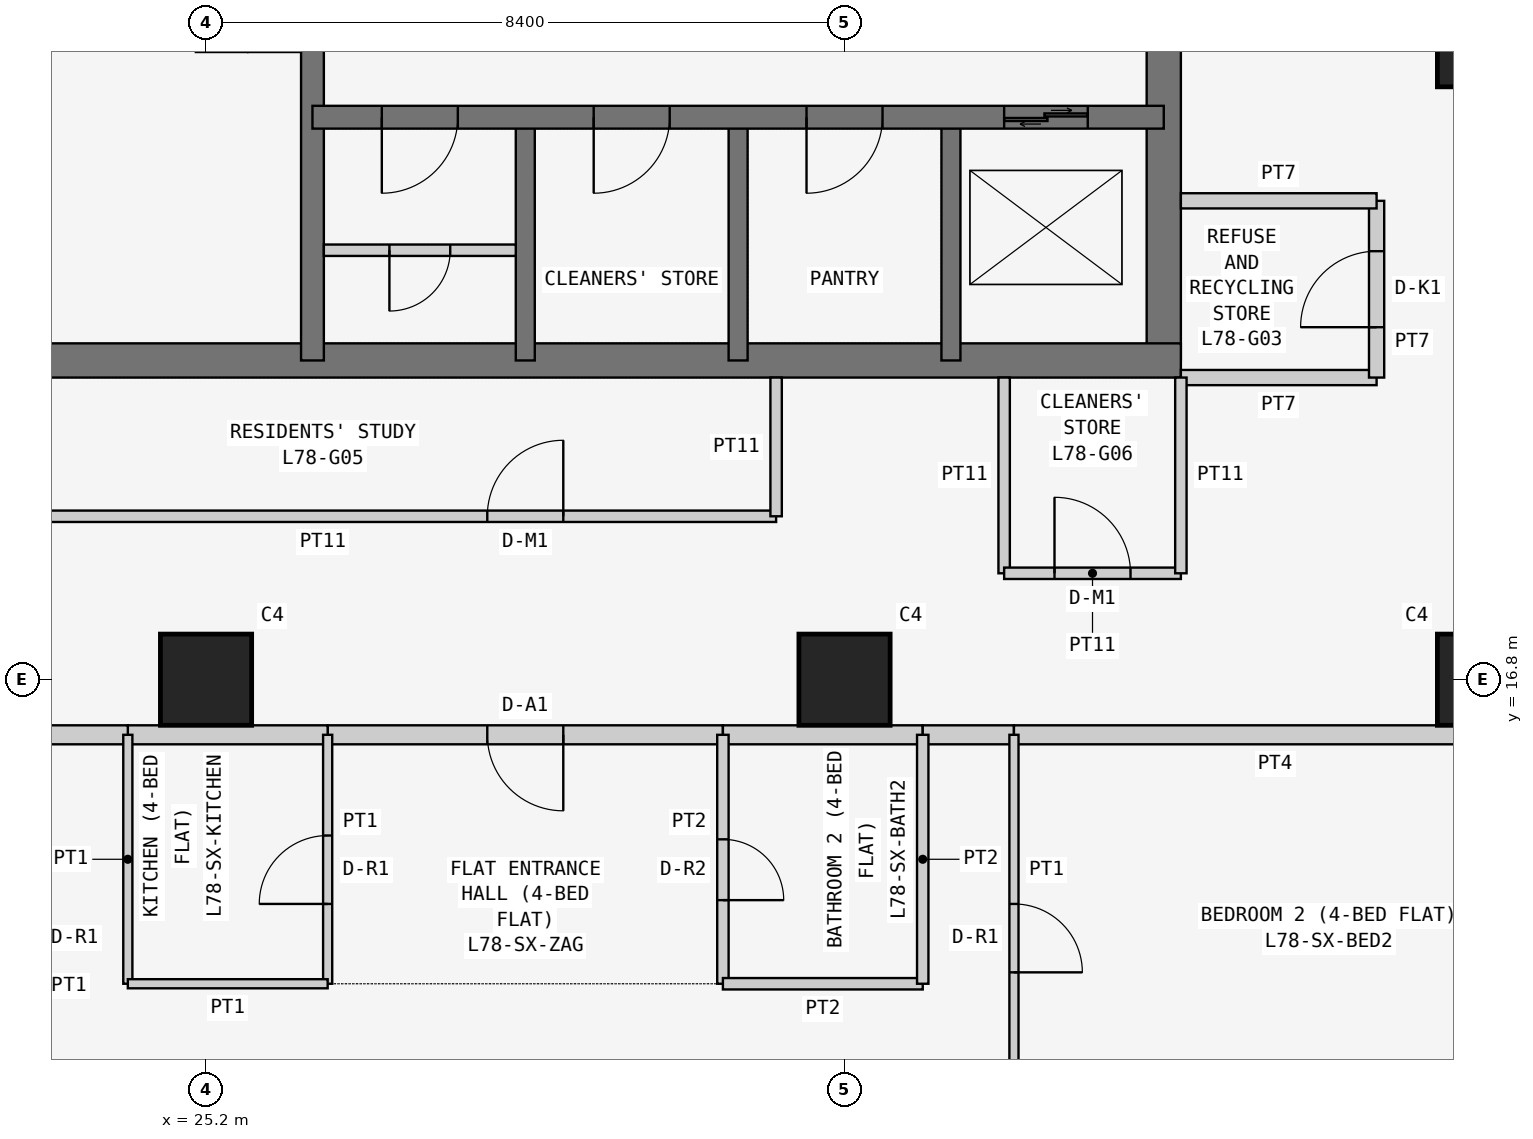
"""IFC4 building model, lengths in metres.
Left out: names, types, materials, properties, quantities, classifications, styles, units other than length and angle.
Written with IfcOpenShell. Run it as: python <this file> out.ifc"""

import sys

from ifc_helpers import new_model, si_unit, direction, frame, frame_2d, origin, origin_2d, place, context, subcontext, project, spatial, rectangle, extrude, element, fill, save


model = new_model("IFC4")
c1 = context("Model", 3, precision=1e-05, world=origin(), true_north=direction((0.0, 1.0)))
c2 = subcontext(c1, "Body", "Model", "MODEL_VIEW")
j1 = project(units=[si_unit("LENGTHUNIT", "METRE"), si_unit("PLANEANGLEUNIT", "RADIAN")], contexts=[c1])
p1 = place(None, origin())
s1 = spatial("IfcSite", under=j1, at=p1, CompositionType="ELEMENT")
p2 = place(p1, origin())
s2 = spatial("IfcBuilding", under=s1, at=p2, CompositionType="ELEMENT")
p3 = place(p2, frame((0.0, 0.0, 297.3)))
s3 = spatial("IfcBuildingStorey", under=s2, at=p3, CompositionType="ELEMENT", Elevation=297.3)
for number, where, z_axis, x_axis in (
    (1, (25.2, 16.8, 0.0), (0.0, 0.0, 1.0), (1.0, 0.0, 0.0)),
    (2, (33.6, 16.8, 0.0), (0.0, 0.0, 1.0), (1.0, 0.0, 0.0)),
    (3, (42.0, 16.8, 0.0), (0.0, 0.0, 1.0), (1.0, 0.0, 0.0)),
    (4, (42.0, 25.2, 0.0), (0.0, 0.0, 1.0), (1.0, 0.0, 0.0)),
):
    element("IfcColumn", number, at=place(p3, frame(where, z_axis=z_axis, x_axis=x_axis)), inside=s3, PredefinedType="COLUMN", context=c2, shape_type="SweptSolid", body=[
        extrude(rectangle(XDim=1.2, YDim=1.2, at=origin_2d()), origin(), (0.0, 0.0, 1.0), 3.6),
    ])
p4 = place(p3, frame((21.0, 21.0, 0.0), z_axis=(0.0, 0.0, 1.0), x_axis=(1.0, 0.0, 0.0)))
e5 = element("IfcWall", 5, at=p4, inside=s3, PredefinedType="SHEAR", context=c2, shape_type="SweptSolid", body=[
    extrude(rectangle(XDim=17.025, YDim=0.45, at=frame_2d((8.512, 0.0))), origin(), (0.0, 0.0, 1.0), 3.6),
])
p5 = place(p3, frame((37.8, 21.0, 0.0), z_axis=(0.0, 0.0, 1.0), x_axis=(0.0, 1.0, 0.0)))
e6 = element("IfcWall", 6, at=p5, inside=s3, PredefinedType="SHEAR", context=c2, shape_type="SweptSolid", body=[
    extrude(rectangle(XDim=17.025, YDim=0.45, at=frame_2d((8.512, 0.0))), origin(), (0.0, 0.0, 1.0), 3.6),
])
p6 = place(p5, frame((5.2, 0.0, 0.0)))
e7 = element("IfcOpeningElement", 7, at=p6, cuts=e6, PredefinedType="OPENING", context=c2, shape_type="SweptSolid", body=[
    extrude(rectangle(XDim=1.2, YDim=2.1, at=frame_2d((0.6, 1.05))), frame((0.0, 0.235, 0.0), z_axis=(0.0, -1.0, 0.0), x_axis=(1.0, 0.0, 0.0)), (0.0, 0.0, 1.0), 0.47),
])
p7 = place(p3, frame((26.6, 21.0, 0.0), z_axis=(0.0, 0.0, 1.0), x_axis=(0.0, 1.0, 0.0)))
e8 = element("IfcWall", 8, at=p7, inside=s3, PredefinedType="SHEAR", context=c2, shape_type="SweptSolid", body=[
    extrude(rectangle(XDim=16.8, YDim=0.3, at=frame_2d((8.4, 0.0))), origin(), (0.0, 0.0, 1.0), 3.6),
])
p8 = place(p7, frame((10.4, 0.0, 0.0)))
e9 = element("IfcOpeningElement", 9, at=p8, cuts=e8, PredefinedType="OPENING", context=c2, shape_type="SweptSolid", body=[
    extrude(rectangle(XDim=1.2, YDim=2.1, at=frame_2d((0.6, 1.05))), frame((0.0, 0.16, 0.0), z_axis=(0.0, -1.0, 0.0), x_axis=(1.0, 0.0, 0.0)), (0.0, 0.0, 1.0), 0.32),
])
p9 = place(p3, frame((26.6, 24.2, 0.0), z_axis=(0.0, 0.0, 1.0), x_axis=(1.0, 0.0, 0.0)))
e10 = element("IfcWall", 10, at=p9, inside=s3, PredefinedType="SHEAR", context=c2, shape_type="SweptSolid", body=[
    extrude(rectangle(XDim=11.2, YDim=0.3, at=frame_2d((5.6, 0.0))), origin(), (0.0, 0.0, 1.0), 3.6),
])
p10 = place(p9, frame((0.913, 0.0, 0.0)))
e11 = element("IfcOpeningElement", 11, at=p10, cuts=e10, PredefinedType="OPENING", context=c2, shape_type="SweptSolid", body=[
    extrude(rectangle(XDim=1.0, YDim=2.1, at=frame_2d((0.5, 1.05))), frame((0.0, 0.16, 0.0), z_axis=(0.0, -1.0, 0.0), x_axis=(1.0, 0.0, 0.0)), (0.0, 0.0, 1.0), 0.32),
])
p11 = place(p9, frame((3.7, 0.0, 0.0)))
e12 = element("IfcOpeningElement", 12, at=p11, cuts=e10, PredefinedType="OPENING", context=c2, shape_type="SweptSolid", body=[
    extrude(rectangle(XDim=1.0, YDim=2.1, at=frame_2d((0.5, 1.05))), frame((0.0, 0.16, 0.0), z_axis=(0.0, -1.0, 0.0), x_axis=(1.0, 0.0, 0.0)), (0.0, 0.0, 1.0), 0.32),
])
p12 = place(p9, frame((6.5, 0.0, 0.0)))
e13 = element("IfcOpeningElement", 13, at=p12, cuts=e10, PredefinedType="OPENING", context=c2, shape_type="SweptSolid", body=[
    extrude(rectangle(XDim=1.0, YDim=2.1, at=frame_2d((0.5, 1.05))), frame((0.0, 0.16, 0.0), z_axis=(0.0, -1.0, 0.0), x_axis=(1.0, 0.0, 0.0)), (0.0, 0.0, 1.0), 0.32),
])
p13 = place(p9, frame((9.1, 0.0, 0.0)))
e14 = element("IfcOpeningElement", 14, at=p13, cuts=e10, PredefinedType="OPENING", context=c2, shape_type="SweptSolid", body=[
    extrude(rectangle(XDim=1.1, YDim=2.1, at=frame_2d((0.55, 1.05))), frame((0.0, 0.16, 0.0), z_axis=(0.0, -1.0, 0.0), x_axis=(1.0, 0.0, 0.0)), (0.0, 0.0, 1.0), 0.32),
])
for number, where, z_axis, x_axis in (
    (15, (29.4, 21.0, 0.0), (0.0, 0.0, 1.0), (0.0, 1.0, 0.0)),
    (16, (32.2, 21.0, 0.0), (0.0, 0.0, 1.0), (0.0, 1.0, 0.0)),
    (17, (35.0, 21.0, 0.0), (0.0, 0.0, 1.0), (0.0, 1.0, 0.0)),
):
    element("IfcWall", number, at=place(p3, frame(where, z_axis=z_axis, x_axis=x_axis)), inside=s3, PredefinedType="SHEAR", context=c2, shape_type="SweptSolid", body=[
        extrude(rectangle(XDim=3.2, YDim=0.25, at=frame_2d((1.6, 0.0))), origin(), (0.0, 0.0, 1.0), 3.6),
    ])
p14 = place(p3, frame((38.025, 20.775, 0.0), z_axis=(0.0, 0.0, 1.0), x_axis=(1.0, 0.0, 0.0)))
e18 = element("IfcWall", 18, at=p14, inside=s3, PredefinedType="PARTITIONING", context=c2, shape_type="SweptSolid", body=[
    extrude(rectangle(XDim=2.575, YDim=0.2, at=frame_2d((1.288, 0.0))), origin(), (0.0, 0.0, 1.0), 3.35),
])
p15 = place(p3, frame((40.6, 20.775, 0.0), z_axis=(0.0, 0.0, 1.0), x_axis=(0.0, 1.0, 0.0)))
e19 = element("IfcWall", 19, at=p15, inside=s3, PredefinedType="PARTITIONING", context=c2, shape_type="SweptSolid", body=[
    extrude(rectangle(XDim=2.325, YDim=0.2, at=frame_2d((1.163, 0.0))), origin(), (0.0, 0.0, 1.0), 3.35),
])
p16 = place(p15, frame((0.663, 0.0, 0.0)))
e20 = element("IfcOpeningElement", 20, at=p16, cuts=e19, PredefinedType="OPENING", context=c2, shape_type="SweptSolid", body=[
    extrude(rectangle(XDim=1.0, YDim=2.1, at=frame_2d((0.5, 1.05))), frame((0.0, 0.11, 0.0), z_axis=(0.0, -1.0, 0.0), x_axis=(1.0, 0.0, 0.0)), (0.0, 0.0, 1.0), 0.22),
])
p17 = place(p3, frame((40.6, 23.1, 0.0), z_axis=(0.0, 0.0, 1.0), x_axis=(-1.0, 0.0, 0.0)))
e21 = element("IfcWall", 21, at=p17, inside=s3, PredefinedType="PARTITIONING", context=c2, shape_type="SweptSolid", body=[
    extrude(rectangle(XDim=2.575, YDim=0.2, at=frame_2d((1.288, 0.0))), origin(), (0.0, 0.0, 1.0), 3.35),
])
p18 = place(p3, frame((20.775, 18.95, 0.0), z_axis=(0.0, 0.0, 1.0), x_axis=(1.0, 0.0, 0.0)))
e22 = element("IfcWall", 22, at=p18, inside=s3, PredefinedType="PARTITIONING", context=c2, shape_type="SweptSolid", body=[
    extrude(rectangle(XDim=11.925, YDim=0.15, at=frame_2d((5.962, 0.0))), origin(), (0.0, 0.0, 1.0), 3.35),
])
p19 = place(p18, frame((8.125, 0.0, 0.0)))
e23 = element("IfcOpeningElement", 23, at=p19, cuts=e22, PredefinedType="OPENING", context=c2, shape_type="SweptSolid", body=[
    extrude(rectangle(XDim=1.0, YDim=2.1, at=frame_2d((0.5, 1.05))), frame((0.0, 0.085, 0.0), z_axis=(0.0, -1.0, 0.0), x_axis=(1.0, 0.0, 0.0)), (0.0, 0.0, 1.0), 0.17),
])
p20 = place(p3, frame((32.7, 18.95, 0.0), z_axis=(0.0, 0.0, 1.0), x_axis=(0.0, 1.0, 0.0)))
e24 = element("IfcWall", 24, at=p20, inside=s3, PredefinedType="PARTITIONING", context=c2, shape_type="SweptSolid", body=[
    extrude(rectangle(XDim=1.825, YDim=0.15, at=frame_2d((0.913, 0.0))), origin(), (0.0, 0.0, 1.0), 3.35),
])
p21 = place(p3, frame((35.7, 20.775, 0.0), z_axis=(0.0, 0.0, 1.0), x_axis=(0.0, -1.0, 0.0)))
e25 = element("IfcWall", 25, at=p21, inside=s3, PredefinedType="PARTITIONING", context=c2, shape_type="SweptSolid", body=[
    extrude(rectangle(XDim=2.575, YDim=0.15, at=frame_2d((1.288, 0.0))), origin(), (0.0, 0.0, 1.0), 3.35),
])
p22 = place(p3, frame((35.7, 18.2, 0.0), z_axis=(0.0, 0.0, 1.0), x_axis=(1.0, 0.0, 0.0)))
e26 = element("IfcWall", 26, at=p22, inside=s3, PredefinedType="PARTITIONING", context=c2, shape_type="SweptSolid", body=[
    extrude(rectangle(XDim=2.325, YDim=0.15, at=frame_2d((1.163, 0.0))), origin(), (0.0, 0.0, 1.0), 3.35),
])
p23 = place(p22, frame((0.663, 0.0, 0.0)))
e27 = element("IfcOpeningElement", 27, at=p23, cuts=e26, PredefinedType="OPENING", context=c2, shape_type="SweptSolid", body=[
    extrude(rectangle(XDim=1.0, YDim=2.1, at=frame_2d((0.5, 1.05))), frame((0.0, 0.085, 0.0), z_axis=(0.0, -1.0, 0.0), x_axis=(1.0, 0.0, 0.0)), (0.0, 0.0, 1.0), 0.17),
])
p24 = place(p3, frame((38.025, 18.2, 0.0), z_axis=(0.0, 0.0, 1.0), x_axis=(0.0, 1.0, 0.0)))
e28 = element("IfcWall", 28, at=p24, inside=s3, PredefinedType="PARTITIONING", context=c2, shape_type="SweptSolid", body=[
    extrude(rectangle(XDim=2.575, YDim=0.15, at=frame_2d((1.288, 0.0))), origin(), (0.0, 0.0, 1.0), 3.35),
])
p25 = place(p3, frame((32.0, 16.075, 0.0), z_axis=(0.0, 0.0, 1.0), x_axis=(-1.0, 0.0, 0.0)))
e29 = element("IfcWall", 29, at=p25, inside=s3, PredefinedType="PARTITIONING", context=c2, shape_type="SweptSolid", body=[
    extrude(rectangle(XDim=5.2, YDim=0.25, at=frame_2d((2.6, 0.0))), origin(), (0.0, 0.0, 1.0), 3.35),
])
p26 = place(p25, frame((2.1, 0.0, 0.0)))
e30 = element("IfcOpeningElement", 30, at=p26, cuts=e29, PredefinedType="OPENING", context=c2, shape_type="SweptSolid", body=[
    extrude(rectangle(XDim=1.0, YDim=2.1, at=frame_2d((0.5, 1.05))), frame((0.0, 0.135, 0.0), z_axis=(0.0, -1.0, 0.0), x_axis=(1.0, 0.0, 0.0)), (0.0, 0.0, 1.0), 0.27),
])
p27 = place(p3, frame((34.629, 16.075, 0.0), z_axis=(0.0, 0.0, 1.0), x_axis=(-1.0, 0.0, 0.0)))
e31 = element("IfcWall", 31, at=p27, inside=s3, PredefinedType="PARTITIONING", context=c2, shape_type="SweptSolid", body=[
    extrude(rectangle(XDim=2.629, YDim=0.25, at=frame_2d((1.314, 0.0))), origin(), (0.0, 0.0, 1.0), 3.35),
])
p28 = place(p3, frame((26.8, 16.075, 0.0), z_axis=(0.0, 0.0, 1.0), x_axis=(-1.0, 0.0, 0.0)))
e32 = element("IfcWall", 32, at=p28, inside=s3, PredefinedType="PARTITIONING", context=c2, shape_type="SweptSolid", body=[
    extrude(rectangle(XDim=2.629, YDim=0.25, at=frame_2d((1.314, 0.0))), origin(), (0.0, 0.0, 1.0), 3.35),
])
p29 = place(p3, frame((24.171, 16.075, 0.0), z_axis=(0.0, 0.0, 1.0), x_axis=(-1.0, 0.0, 0.0)))
e33 = element("IfcWall", 33, at=p29, inside=s3, PredefinedType="PARTITIONING", context=c2, shape_type="SweptSolid", body=[
    extrude(rectangle(XDim=1.2, YDim=0.25, at=frame_2d((0.6, 0.0))), origin(), (0.0, 0.0, 1.0), 3.35),
])
p30 = place(p3, frame((35.829, 16.075, 0.0), z_axis=(0.0, 0.0, 1.0), x_axis=(-1.0, 0.0, 0.0)))
e34 = element("IfcWall", 34, at=p30, inside=s3, PredefinedType="PARTITIONING", context=c2, shape_type="SweptSolid", body=[
    extrude(rectangle(XDim=1.2, YDim=0.25, at=frame_2d((0.6, 0.0))), origin(), (0.0, 0.0, 1.0), 3.35),
])
p31 = place(p3, frame((42.7, 16.075, 0.0), z_axis=(0.0, 0.0, 1.0), x_axis=(-1.0, 0.0, 0.0)))
e35 = element("IfcWall", 35, at=p31, inside=s3, PredefinedType="PARTITIONING", context=c2, shape_type="SweptSolid", body=[
    extrude(rectangle(XDim=6.871, YDim=0.25, at=frame_2d((3.436, 0.0))), origin(), (0.0, 0.0, 1.0), 3.35),
])
p32 = place(p3, frame((32.0, 12.8, 0.0), z_axis=(0.0, 0.0, 1.0), x_axis=(0.0, 1.0, 0.0)))
e36 = element("IfcWall", 36, at=p32, inside=s3, PredefinedType="PARTITIONING", context=c2, shape_type="SweptSolid", body=[
    extrude(rectangle(XDim=3.275, YDim=0.15, at=frame_2d((1.637, 0.0))), origin(), (0.0, 0.0, 1.0), 3.35),
])
p33 = place(p32, frame((1.1, 0.0, 0.0)))
e37 = element("IfcOpeningElement", 37, at=p33, cuts=e36, PredefinedType="OPENING", context=c2, shape_type="SweptSolid", body=[
    extrude(rectangle(XDim=0.8, YDim=2.1, at=frame_2d((0.4, 1.05))), frame((0.0, 0.085, 0.0), z_axis=(0.0, -1.0, 0.0), x_axis=(1.0, 0.0, 0.0)), (0.0, 0.0, 1.0), 0.17),
])
p34 = place(p3, frame((26.8, 16.075, 0.0), z_axis=(0.0, 0.0, 1.0), x_axis=(0.0, -1.0, 0.0)))
e38 = element("IfcWall", 38, at=p34, inside=s3, PredefinedType="PARTITIONING", context=c2, shape_type="SweptSolid", body=[
    extrude(rectangle(XDim=3.275, YDim=0.12, at=frame_2d((1.637, 0.0))), origin(), (0.0, 0.0, 1.0), 3.35),
])
p35 = place(p34, frame((1.325, 0.0, 0.0)))
e39 = element("IfcOpeningElement", 39, at=p35, cuts=e38, PredefinedType="OPENING", context=c2, shape_type="SweptSolid", body=[
    extrude(rectangle(XDim=0.9, YDim=2.1, at=frame_2d((0.45, 1.05))), frame((0.0, 0.07, 0.0), z_axis=(0.0, -1.0, 0.0), x_axis=(1.0, 0.0, 0.0)), (0.0, 0.0, 1.0), 0.14),
])
p36 = place(p3, frame((32.0, 12.8, 0.0), z_axis=(0.0, 0.0, 1.0), x_axis=(1.0, 0.0, 0.0)))
e40 = element("IfcWall", 40, at=p36, inside=s3, PredefinedType="PARTITIONING", context=c2, shape_type="SweptSolid", body=[
    extrude(rectangle(XDim=2.629, YDim=0.15, at=frame_2d((1.314, 0.0))), origin(), (0.0, 0.0, 1.0), 3.35),
])
p37 = place(p3, frame((34.629, 12.8, 0.0), z_axis=(0.0, 0.0, 1.0), x_axis=(0.0, 1.0, 0.0)))
e41 = element("IfcWall", 41, at=p37, inside=s3, PredefinedType="PARTITIONING", context=c2, shape_type="SweptSolid", body=[
    extrude(rectangle(XDim=3.275, YDim=0.15, at=frame_2d((1.637, 0.0))), origin(), (0.0, 0.0, 1.0), 3.35),
])
p38 = place(p3, frame((24.171, 16.075, 0.0), z_axis=(0.0, 0.0, 1.0), x_axis=(0.0, -1.0, 0.0)))
e42 = element("IfcWall", 42, at=p38, inside=s3, PredefinedType="PARTITIONING", context=c2, shape_type="SweptSolid", body=[
    extrude(rectangle(XDim=3.275, YDim=0.12, at=frame_2d((1.637, 0.0))), origin(), (0.0, 0.0, 1.0), 3.35),
])
p39 = place(p3, frame((24.171, 12.8, 0.0), z_axis=(0.0, 0.0, 1.0), x_axis=(1.0, 0.0, 0.0)))
e43 = element("IfcWall", 43, at=p39, inside=s3, PredefinedType="PARTITIONING", context=c2, shape_type="SweptSolid", body=[
    extrude(rectangle(XDim=2.629, YDim=0.12, at=frame_2d((1.314, 0.0))), origin(), (0.0, 0.0, 1.0), 3.35),
])
p40 = place(p3, frame((35.829, 16.075, 0.0), z_axis=(0.0, 0.0, 1.0), x_axis=(0.0, -1.0, 0.0)))
e44 = element("IfcWall", 44, at=p40, inside=s3, PredefinedType="PARTITIONING", context=c2, shape_type="SweptSolid", body=[
    extrude(rectangle(XDim=5.075, YDim=0.12, at=frame_2d((2.538, 0.0))), origin(), (0.0, 0.0, 1.0), 3.35),
])
p41 = place(p40, frame((2.225, 0.0, 0.0)))
e45 = element("IfcOpeningElement", 45, at=p41, cuts=e44, PredefinedType="OPENING", context=c2, shape_type="SweptSolid", body=[
    extrude(rectangle(XDim=0.9, YDim=2.1, at=frame_2d((0.45, 1.05))), frame((0.0, 0.07, 0.0), z_axis=(0.0, -1.0, 0.0), x_axis=(1.0, 0.0, 0.0)), (0.0, 0.0, 1.0), 0.14),
])
p42 = place(p3, frame((26.75, 22.45, 0.0), z_axis=(0.0, 0.0, 1.0), x_axis=(1.0, 0.0, 0.0)))
e46 = element("IfcWall", 46, at=p42, inside=s3, PredefinedType="PARTITIONING", context=c2, shape_type="SweptSolid", body=[
    extrude(rectangle(XDim=2.525, YDim=0.15, at=frame_2d((1.262, 0.0))), origin(), (0.0, 0.0, 1.0), 3.35),
])
p43 = place(p42, frame((0.863, 0.0, 0.0)))
e47 = element("IfcOpeningElement", 47, at=p43, cuts=e46, PredefinedType="OPENING", context=c2, shape_type="SweptSolid", body=[
    extrude(rectangle(XDim=0.8, YDim=2.1, at=frame_2d((0.4, 1.05))), frame((0.0, 0.085, 0.0), z_axis=(0.0, -1.0, 0.0), x_axis=(1.0, 0.0, 0.0)), (0.0, 0.0, 1.0), 0.17),
])
p44 = place(p16, origin())
e48 = element("IfcDoor", 48, at=p44, inside=s3, OperationType="SINGLE_SWING_LEFT", PredefinedType="DOOR", context=c2, shape_type="SweptSolid", body=[
    extrude(rectangle(XDim=1.0, YDim=2.1, at=frame_2d((0.5, 1.05))), frame((0.0, 0.025, 0.0), z_axis=(0.0, -1.0, 0.0), x_axis=(1.0, 0.0, 0.0)), (0.0, 0.0, 1.0), 0.05),
])
fill(e20, e48)
p45 = place(p19, origin())
e49 = element("IfcDoor", 49, at=p45, inside=s3, OperationType="SINGLE_SWING_RIGHT", PredefinedType="DOOR", context=c2, shape_type="SweptSolid", body=[
    extrude(rectangle(XDim=1.0, YDim=2.1, at=frame_2d((0.5, 1.05))), frame((0.0, 0.025, 0.0), z_axis=(0.0, -1.0, 0.0), x_axis=(1.0, 0.0, 0.0)), (0.0, 0.0, 1.0), 0.05),
])
fill(e23, e49)
p46 = place(p23, origin())
e50 = element("IfcDoor", 50, at=p46, inside=s3, OperationType="SINGLE_SWING_LEFT", PredefinedType="DOOR", context=c2, shape_type="SweptSolid", body=[
    extrude(rectangle(XDim=1.0, YDim=2.1, at=frame_2d((0.5, 1.05))), frame((0.0, 0.025, 0.0), z_axis=(0.0, -1.0, 0.0), x_axis=(1.0, 0.0, 0.0)), (0.0, 0.0, 1.0), 0.05),
])
fill(e27, e50)
p47 = place(p26, origin())
e51 = element("IfcDoor", 51, at=p47, inside=s3, OperationType="SINGLE_SWING_LEFT", PredefinedType="DOOR", context=c2, shape_type="SweptSolid", body=[
    extrude(rectangle(XDim=1.0, YDim=2.1, at=frame_2d((0.5, 1.05))), frame((0.0, 0.025, 0.0), z_axis=(0.0, -1.0, 0.0), x_axis=(1.0, 0.0, 0.0)), (0.0, 0.0, 1.0), 0.05),
])
fill(e30, e51)
p48 = place(p33, frame((0.8, 0.0, 0.0), z_axis=(0.0, 0.0, 1.0), x_axis=(-1.0, 0.0, 0.0)))
e52 = element("IfcDoor", 52, at=p48, inside=s3, OperationType="SINGLE_SWING_RIGHT", PredefinedType="DOOR", context=c2, shape_type="SweptSolid", body=[
    extrude(rectangle(XDim=0.8, YDim=2.1, at=frame_2d((0.4, 1.05))), frame((0.0, 0.025, 0.0), z_axis=(0.0, -1.0, 0.0), x_axis=(1.0, 0.0, 0.0)), (0.0, 0.0, 1.0), 0.05),
])
fill(e37, e52)
p49 = place(p35, frame((0.9, 0.0, 0.0), z_axis=(0.0, 0.0, 1.0), x_axis=(-1.0, 0.0, 0.0)))
e53 = element("IfcDoor", 53, at=p49, inside=s3, OperationType="SINGLE_SWING_LEFT", PredefinedType="DOOR", context=c2, shape_type="SweptSolid", body=[
    extrude(rectangle(XDim=0.9, YDim=2.1, at=frame_2d((0.45, 1.05))), frame((0.0, 0.025, 0.0), z_axis=(0.0, -1.0, 0.0), x_axis=(1.0, 0.0, 0.0)), (0.0, 0.0, 1.0), 0.05),
])
fill(e39, e53)
p50 = place(p41, origin())
e54 = element("IfcDoor", 54, at=p50, inside=s3, OperationType="SINGLE_SWING_RIGHT", PredefinedType="DOOR", context=c2, shape_type="SweptSolid", body=[
    extrude(rectangle(XDim=0.9, YDim=2.1, at=frame_2d((0.45, 1.05))), frame((0.0, 0.025, 0.0), z_axis=(0.0, -1.0, 0.0), x_axis=(1.0, 0.0, 0.0)), (0.0, 0.0, 1.0), 0.05),
])
fill(e45, e54)
p51 = place(p10, frame((1.0, 0.0, 0.0), z_axis=(0.0, 0.0, 1.0), x_axis=(-1.0, 0.0, 0.0)))
e55 = element("IfcDoor", 55, at=p51, inside=s3, OperationType="SINGLE_SWING_RIGHT", PredefinedType="DOOR", context=c2, shape_type="SweptSolid", body=[
    extrude(rectangle(XDim=1.0, YDim=2.1, at=frame_2d((0.5, 1.05))), frame((0.0, 0.025, 0.0), z_axis=(0.0, -1.0, 0.0), x_axis=(1.0, 0.0, 0.0)), (0.0, 0.0, 1.0), 0.05),
])
fill(e11, e55)
p52 = place(p43, frame((0.8, 0.0, 0.0), z_axis=(0.0, 0.0, 1.0), x_axis=(-1.0, 0.0, 0.0)))
e56 = element("IfcDoor", 56, at=p52, inside=s3, OperationType="SINGLE_SWING_RIGHT", PredefinedType="DOOR", context=c2, shape_type="SweptSolid", body=[
    extrude(rectangle(XDim=0.8, YDim=2.1, at=frame_2d((0.4, 1.05))), frame((0.0, 0.025, 0.0), z_axis=(0.0, -1.0, 0.0), x_axis=(1.0, 0.0, 0.0)), (0.0, 0.0, 1.0), 0.05),
])
fill(e47, e56)
p53 = place(p11, frame((1.0, 0.0, 0.0), z_axis=(0.0, 0.0, 1.0), x_axis=(-1.0, 0.0, 0.0)))
e57 = element("IfcDoor", 57, at=p53, inside=s3, OperationType="SINGLE_SWING_RIGHT", PredefinedType="DOOR", context=c2, shape_type="SweptSolid", body=[
    extrude(rectangle(XDim=1.0, YDim=2.1, at=frame_2d((0.5, 1.05))), frame((0.0, 0.025, 0.0), z_axis=(0.0, -1.0, 0.0), x_axis=(1.0, 0.0, 0.0)), (0.0, 0.0, 1.0), 0.05),
])
fill(e12, e57)
p54 = place(p12, frame((1.0, 0.0, 0.0), z_axis=(0.0, 0.0, 1.0), x_axis=(-1.0, 0.0, 0.0)))
e58 = element("IfcDoor", 58, at=p54, inside=s3, OperationType="SINGLE_SWING_RIGHT", PredefinedType="DOOR", context=c2, shape_type="SweptSolid", body=[
    extrude(rectangle(XDim=1.0, YDim=2.1, at=frame_2d((0.5, 1.05))), frame((0.0, 0.025, 0.0), z_axis=(0.0, -1.0, 0.0), x_axis=(1.0, 0.0, 0.0)), (0.0, 0.0, 1.0), 0.05),
])
fill(e13, e58)
p55 = place(p13, origin())
e59 = element("IfcDoor", 59, at=p55, inside=s3, OperationType="DOUBLE_DOOR_SLIDING", PredefinedType="DOOR", context=c2, shape_type="SweptSolid", body=[
    extrude(rectangle(XDim=1.1, YDim=2.1, at=frame_2d((0.55, 1.05))), frame((0.0, 0.025, 0.0), z_axis=(0.0, -1.0, 0.0), x_axis=(1.0, 0.0, 0.0)), (0.0, 0.0, 1.0), 0.05),
])
fill(e14, e59)
save(model, sys.argv[1])
